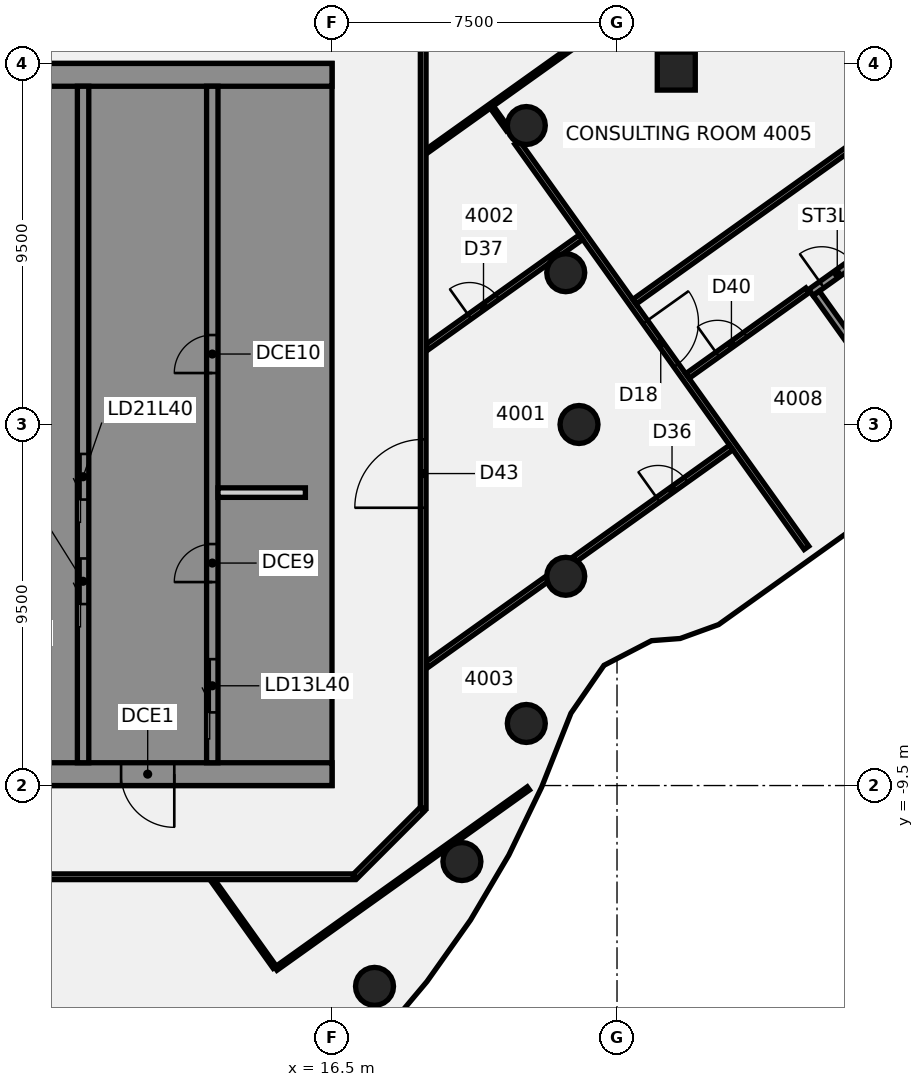
"""IFC4 building model, lengths in metres.
Left out: names, types, materials, properties, quantities, classifications, styles, units other than length and angle.
Written with IfcOpenShell. Run it as: python <this file> out.ifc"""

import sys

from ifc_helpers import new_model, si_unit, direction, frame, frame_2d, origin, origin_2d, place, context, subcontext, project, spatial, polyline, rectangle, circle, outline, extrude, element, fill, save


model = new_model("IFC4")
c1 = context("Model", 3, precision=1e-05, world=origin(), true_north=direction((0.0, 1.0)))
c2 = subcontext(c1, "Body", "Model", "MODEL_VIEW")
j1 = project(units=[si_unit("LENGTHUNIT", "METRE"), si_unit("PLANEANGLEUNIT", "RADIAN")], contexts=[c1])
p1 = place(None, origin())
s1 = spatial("IfcSite", under=j1, at=p1, CompositionType="ELEMENT")
p2 = place(p1, origin())
s2 = spatial("IfcBuilding", under=s1, at=p2, CompositionType="ELEMENT")
p3 = place(p2, frame((0.0, 0.0, 163.0)))
s3 = spatial("IfcBuildingStorey", under=s2, at=p3, CompositionType="ELEMENT", Elevation=163.0)
for number, where, z_axis, x_axis in (
    (1, (23.0, 0.0, -0.14), (0.0, 0.0, 1.0), (1.0, 0.0, 0.0)),
    (2, (22.651, 3.994, -0.14), (0.0, 0.0, 1.0), (1.0, 0.0, 0.0)),
    (3, (21.613, 7.866, -0.14), (0.0, 0.0, 1.0), (1.0, 0.0, 0.0)),
    (4, (17.619, -14.784, -0.14), (0.0, 0.0, 1.0), (1.0, 0.0, 0.0)),
    (5, (19.919, -11.5, -0.14), (0.0, 0.0, 1.0), (1.0, 0.0, 0.0)),
    (6, (21.613, -7.866, -0.14), (0.0, 0.0, 1.0), (1.0, 0.0, 0.0)),
    (7, (22.651, -3.994, -0.14), (0.0, 0.0, 1.0), (1.0, 0.0, 0.0)),
):
    element("IfcColumn", number, at=place(p3, frame(where, z_axis=z_axis, x_axis=x_axis)), inside=s3, PredefinedType="COLUMN", context=c2, shape_type="SweptSolid", body=[
        extrude(circle(Radius=0.5, at=origin_2d()), origin(), (0.0, 0.0, 1.0), 3.75),
    ])
p4 = place(p3, frame((25.56, 9.299, -0.139), z_axis=(-0.045356883654, 0.016919354017, 0.998827556971), x_axis=(0.579654184092, -0.813874885655, 0.040108569717)))
e8 = element("IfcColumn", 8, at=p4, inside=s3, PredefinedType="COLUMN", context=c2, shape_type="SweptSolid", body=[
    extrude(rectangle(XDim=1.0, YDim=1.0, at=origin_2d()), origin(), (0.0, 0.0, 1.0), 3.752),
])
p5 = place(p3, frame((2.201, -12.002, 0.0), z_axis=(0.0, 0.0, 1.0), x_axis=(0.580967898018, -0.813926471785, 0.0)))
e9 = element("IfcWall", 9, at=p5, inside=s3, PredefinedType="PARTITIONING", context=c2, shape_type="SweptSolid", body=[
    extrude(rectangle(XDim=13.672, YDim=0.15, at=frame_2d((6.836, 0.0))), origin(), (0.0, 0.0, 1.0), 3.01),
])
p6 = place(p3, frame((13.355, -11.986, 0.0), z_axis=(0.0, 0.0, 1.0), x_axis=(0.581139863007, -0.813803698458, 0.0)))
e10 = element("IfcWall", 10, at=p6, inside=s3, PredefinedType="PARTITIONING", context=c2, shape_type="SweptSolid", body=[
    extrude(rectangle(XDim=2.819, YDim=0.1, at=frame_2d((1.409, 0.0))), origin(), (0.0, 0.0, 1.0), 3.01),
])
p7 = place(p3, frame((20.706, 8.352, 0.0), z_axis=(0.0, 0.0, 1.0), x_axis=(0.58101820206, -0.813890563206, 0.0)))
e11 = element("IfcWall", 11, at=p7, inside=s3, PredefinedType="PARTITIONING", context=c2, shape_type="SweptSolid", body=[
    extrude(rectangle(XDim=0.735, YDim=0.1, at=frame_2d((0.367, 0.0))), origin(), (0.0, 0.0, 1.0), 3.01),
])
p8 = place(p3, frame((21.371, 7.421, 0.0), z_axis=(0.0, 0.0, 1.0), x_axis=(0.581007311964, -0.813898337291, 0.0)))
e12 = element("IfcWall", 12, at=p8, inside=s3, PredefinedType="PARTITIONING", context=c2, shape_type="SweptSolid", body=[
    extrude(rectangle(XDim=13.105, YDim=0.15, at=frame_2d((6.552, 0.0))), origin(), (0.0, 0.0, 1.0), 3.01),
])
p9 = place(p8, frame((5.806, 0.0, 0.0)))
e13 = element("IfcOpeningElement", 13, at=p9, cuts=e12, PredefinedType="OPENING", context=c2, shape_type="SweptSolid", body=[
    extrude(rectangle(XDim=1.4, YDim=2.1, at=frame_2d((0.7, 1.05))), frame((0.0, 0.085, 0.0), z_axis=(0.0, -1.0, 0.0), x_axis=(1.0, 0.0, 0.0)), (0.0, 0.0, 1.0), 0.17),
])
p10 = place(p3, frame((-17.1, -11.9, 0.0), z_axis=(0.0, 0.0, 1.0), x_axis=(1.0, 0.0, 0.0)))
e14 = element("IfcWall", 14, at=p10, inside=s3, PredefinedType="PARTITIONING", context=c2, shape_type="SweptSolid", body=[
    extrude(rectangle(XDim=34.165, YDim=0.15, at=frame_2d((17.083, 0.0))), origin(), (0.0, 0.0, 1.0), 3.01),
])
p11 = place(p10, frame((9.703, 0.0, 0.0)))
e15 = element("IfcOpeningElement", 15, at=p11, cuts=e14, PredefinedType="OPENING", context=c2, shape_type="SweptSolid", body=[
    extrude(rectangle(XDim=1.8, YDim=2.1, at=frame_2d((0.9, 1.05))), frame((0.0, 0.085, 0.0), z_axis=(0.0, -1.0, 0.0), x_axis=(1.0, 0.0, 0.0)), (0.0, 0.0, 1.0), 0.17),
])
p12 = place(p10, frame((1.95, 0.0, 0.0)))
e16 = element("IfcOpeningElement", 16, at=p12, cuts=e14, PredefinedType="OPENING", context=c2, shape_type="SweptSolid", body=[
    extrude(rectangle(XDim=1.8, YDim=2.1, at=frame_2d((0.9, 1.05))), frame((0.0, 0.085, 0.0), z_axis=(0.0, -1.0, 0.0), x_axis=(1.0, 0.0, 0.0)), (0.0, 0.0, 1.0), 0.17),
])
p13 = place(p10, frame((23.878, 0.0, 0.0)))
e17 = element("IfcOpeningElement", 17, at=p13, cuts=e14, PredefinedType="OPENING", context=c2, shape_type="SweptSolid", body=[
    extrude(rectangle(XDim=1.8, YDim=2.1, at=frame_2d((0.9, 1.05))), frame((0.0, 0.085, 0.0), z_axis=(0.0, -1.0, 0.0), x_axis=(1.0, 0.0, 0.0)), (0.0, 0.0, 1.0), 0.17),
])
p14 = place(p3, frame((15.022, -14.32, 0.0), z_axis=(0.0, 0.0, 1.0), x_axis=(0.813848610714, 0.581076964643, 0.0)))
e18 = element("IfcWall", 18, at=p14, inside=s3, PredefinedType="PARTITIONING", context=c2, shape_type="SweptSolid", body=[
    extrude(rectangle(XDim=8.165, YDim=0.1, at=frame_2d((4.083, 0.0))), origin(), (0.0, 0.0, 1.0), 3.01),
])
p15 = place(p3, frame((19.002, -6.318, 0.0), z_axis=(0.0, 0.0, 1.0), x_axis=(0.813818497272, 0.581119138816, 0.0)))
e19 = element("IfcWall", 19, at=p15, inside=s3, PredefinedType="PARTITIONING", context=c2, shape_type="SweptSolid", body=[
    extrude(rectangle(XDim=3.88, YDim=0.15, at=frame_2d((1.94, 0.0))), origin(), (0.0, 0.0, 1.0), 3.01),
])
p16 = place(p3, frame((22.884, -3.546, 0.0), z_axis=(0.0, 0.0, 1.0), x_axis=(0.813857304892, 0.581064787502, 0.0)))
e20 = element("IfcWall", 20, at=p16, inside=s3, PredefinedType="PARTITIONING", context=c2, shape_type="SweptSolid", body=[
    extrude(rectangle(XDim=5.061, YDim=0.15, at=frame_2d((2.531, 0.0))), origin(), (0.0, 0.0, 1.0), 3.01),
])
p17 = place(p16, frame((2.7, 0.0, 0.0)))
e21 = element("IfcOpeningElement", 21, at=p17, cuts=e20, PredefinedType="OPENING", context=c2, shape_type="SweptSolid", body=[
    extrude(rectangle(XDim=0.9, YDim=2.1, at=frame_2d((0.45, 1.05))), frame((0.0, 0.085, 0.0), z_axis=(0.0, -1.0, 0.0), x_axis=(1.0, 0.0, 0.0)), (0.0, 0.0, 1.0), 0.17),
])
p18 = place(p3, frame((19.002, 2.037, 0.0), z_axis=(0.0, 0.0, 1.0), x_axis=(0.813849467295, 0.581075764925, 0.0)))
e22 = element("IfcWall", 22, at=p18, inside=s3, PredefinedType="PARTITIONING", context=c2, shape_type="SweptSolid", body=[
    extrude(rectangle(XDim=4.977, YDim=0.15, at=frame_2d((2.488, 0.0))), origin(), (0.0, 0.0, 1.0), 3.01),
])
p19 = place(p18, frame((1.375, 0.0, 0.0)))
e23 = element("IfcOpeningElement", 23, at=p19, cuts=e22, PredefinedType="OPENING", context=c2, shape_type="SweptSolid", body=[
    extrude(rectangle(XDim=0.9, YDim=2.1, at=frame_2d((0.45, 1.05))), frame((0.0, 0.085, 0.0), z_axis=(0.0, -1.0, 0.0), x_axis=(1.0, 0.0, 0.0)), (0.0, 0.0, 1.0), 0.17),
])
p20 = place(p3, frame((18.986, 7.186, 0.0), z_axis=(0.0, 0.0, 1.0), x_axis=(0.814008739191, 0.580852625474, 0.0)))
e24 = element("IfcWall", 24, at=p20, inside=s3, PredefinedType="PARTITIONING", context=c2, shape_type="SweptSolid", body=[
    extrude(rectangle(XDim=5.092, YDim=0.1, at=frame_2d((2.546, 0.0))), origin(), (0.0, 0.0, 1.0), 3.01),
])
p21 = place(p3, frame((24.461, 3.231, 0.0), z_axis=(0.0, 0.0, 1.0), x_axis=(0.81388139954, 0.581031038313, 0.0)))
e25 = element("IfcWall", 25, at=p21, inside=s3, PredefinedType="PARTITIONING", context=c2, shape_type="SweptSolid", body=[
    extrude(rectangle(XDim=17.839, YDim=0.15, at=frame_2d((8.919, 0.0))), origin(), (0.0, 0.0, 1.0), 3.01),
])
p22 = place(p21, frame((8.17, 0.0, 0.0)))
e26 = element("IfcOpeningElement", 26, at=p22, cuts=e25, PredefinedType="OPENING", context=c2, shape_type="SweptSolid", body=[
    extrude(rectangle(XDim=0.9, YDim=2.1, at=frame_2d((0.45, 1.05))), frame((0.0, 0.085, 0.0), z_axis=(0.0, -1.0, 0.0), x_axis=(1.0, 0.0, 0.0)), (0.0, 0.0, 1.0), 0.17),
])
p23 = place(p21, frame((14.62, 0.0, 0.0)))
e27 = element("IfcOpeningElement", 27, at=p23, cuts=e25, PredefinedType="OPENING", context=c2, shape_type="SweptSolid", body=[
    extrude(rectangle(XDim=0.9, YDim=2.1, at=frame_2d((0.45, 1.05))), frame((0.0, 0.085, 0.0), z_axis=(0.0, -1.0, 0.0), x_axis=(1.0, 0.0, 0.0)), (0.0, 0.0, 1.0), 0.17),
])
p24 = place(p3, frame((25.855, 1.278, 0.0), z_axis=(0.0, 0.0, 1.0), x_axis=(0.813869502559, 0.581047702693, 0.0)))
e28 = element("IfcWall", 28, at=p24, inside=s3, PredefinedType="PARTITIONING", context=c2, shape_type="SweptSolid", body=[
    extrude(rectangle(XDim=3.88, YDim=0.15, at=frame_2d((1.94, 0.0))), origin(), (0.0, 0.0, 1.0), 3.01),
])
p25 = place(p24, frame((0.97, 0.0, 0.0)))
e29 = element("IfcOpeningElement", 29, at=p25, cuts=e28, PredefinedType="OPENING", context=c2, shape_type="SweptSolid", body=[
    extrude(rectangle(XDim=0.9, YDim=2.1, at=frame_2d((0.45, 1.05))), frame((0.0, 0.085, 0.0), z_axis=(0.0, -1.0, 0.0), x_axis=(1.0, 0.0, 0.0)), (0.0, 0.0, 1.0), 0.17),
])
p26 = place(p3, frame((17.1, -11.9, 0.0), z_axis=(0.0, 0.0, 1.0), x_axis=(0.707106781187, 0.707106781187, 0.0)))
e30 = element("IfcWall", 30, at=p26, inside=s3, PredefinedType="PARTITIONING", context=c2, shape_type="SweptSolid", body=[
    extrude(rectangle(XDim=2.505, YDim=0.15, at=frame_2d((1.253, 0.0))), origin(), (0.0, 0.0, 1.0), 3.01),
])
p27 = place(p3, frame((18.9, -10.1, 0.0), z_axis=(0.0, 0.0, 1.0), x_axis=(0.0, 1.0, 0.0)))
e31 = element("IfcWall", 31, at=p27, inside=s3, PredefinedType="PARTITIONING", context=c2, shape_type="SweptSolid", body=[
    extrude(rectangle(XDim=20.2, YDim=0.15, at=frame_2d((10.1, 0.0))), origin(), (0.0, 0.0, 1.0), 3.01),
])
p28 = place(p27, frame((7.909, 0.0, 0.0)))
e32 = element("IfcOpeningElement", 32, at=p28, cuts=e31, PredefinedType="OPENING", context=c2, shape_type="SweptSolid", body=[
    extrude(rectangle(XDim=1.8, YDim=2.1, at=frame_2d((0.9, 1.05))), frame((0.0, 0.085, 0.0), z_axis=(0.0, -1.0, 0.0), x_axis=(1.0, 0.0, 0.0)), (0.0, 0.0, 1.0), 0.17),
])
p29 = place(p3, frame((16.5, -9.2, 0.0), z_axis=(0.0, 0.0, 1.0), x_axis=(-1.0, 0.0, 0.0)))
e33 = element("IfcWall", 33, at=p29, inside=s3, PredefinedType="SHEAR", context=c2, shape_type="SweptSolid", body=[
    extrude(rectangle(XDim=13.0, YDim=0.6, at=frame_2d((6.5, 0.0))), origin(), (0.0, 0.0, 1.0), 3.61),
])
p30 = place(p29, frame((4.15, 0.0, 0.0)))
e34 = element("IfcOpeningElement", 34, at=p30, cuts=e33, PredefinedType="OPENING", context=c2, shape_type="SweptSolid", body=[
    extrude(rectangle(XDim=1.4, YDim=2.1, at=frame_2d((0.7, 1.05))), frame((0.0, 0.31, 0.0), z_axis=(0.0, -1.0, 0.0), x_axis=(1.0, 0.0, 0.0)), (0.0, 0.0, 1.0), 0.62),
])
p31 = place(p29, frame((10.125, 0.0, 0.0)))
e35 = element("IfcOpeningElement", 35, at=p31, cuts=e33, PredefinedType="OPENING", context=c2, shape_type="SweptSolid", body=[
    extrude(rectangle(XDim=1.4, YDim=2.1, at=frame_2d((0.7, 1.05))), frame((0.0, 0.31, 0.0), z_axis=(0.0, -1.0, 0.0), x_axis=(1.0, 0.0, 0.0)), (0.0, 0.0, 1.0), 0.62),
])
p32 = place(p3, origin())
e36 = element("IfcWall", 36, at=p32, inside=s3, PredefinedType="SHEAR", context=c2, shape_type="SweptSolid", body=[
    extrude(outline(polyline([(13.5, -8.125), (13.5, -8.9), (15.9, -8.9), (16.5, -8.9), (16.5, 8.9), (15.9, 8.9), (13.5, 8.9), (13.5, 8.125), (15.9, 8.125), (15.9, 5.625), (13.5, 5.625), (13.5, 5.375), (15.9, 5.375), (15.9, -5.375), (13.5, -5.375), (13.5, -5.625), (15.9, -5.625), (15.9, -8.125), (13.5, -8.125)])), origin(), (0.0, 0.0, 1.0), 3.61),
])
p33 = place(p3, frame((16.5, 9.2, 0.0), z_axis=(0.0, 0.0, 1.0), x_axis=(-1.0, 0.0, 0.0)))
e37 = element("IfcWall", 37, at=p33, inside=s3, PredefinedType="SHEAR", context=c2, shape_type="SweptSolid", body=[
    extrude(rectangle(XDim=13.0, YDim=0.6, at=frame_2d((6.5, 0.0))), origin(), (0.0, 0.0, 1.0), 3.61),
])
p34 = place(p3, origin())
e38 = element("IfcWall", 38, at=p34, inside=s3, PredefinedType="SHEAR", context=c2, shape_type="SweptSolid", body=[
    extrude(outline(polyline([(9.8, -5.375), (7.5, -5.375), (7.5, -2.875), (9.8, -2.875), (9.8, -2.625), (7.5, -2.625), (7.5, -0.125), (9.8, -0.125), (9.8, 0.125), (7.5, 0.125), (7.5, 2.625), (9.8, 2.625), (9.8, 2.875), (7.5, 2.875), (7.5, 5.375), (9.8, 5.375), (9.8, 5.625), (7.5, 5.625), (7.5, 8.125), (9.8, 8.125), (9.8, 8.9), (7.5, 8.9), (7.2, 8.9), (7.2, -5.625), (7.5, -5.625), (9.8, -5.625), (9.8, -5.375)])), origin(), (0.0, 0.0, 1.0), 3.61),
])
p35 = place(p3, origin())
e39 = element("IfcWall", 39, at=p35, inside=s3, PredefinedType="SHEAR", context=c2, shape_type="SweptSolid", body=[
    extrude(outline(polyline([(7.5, -8.125), (7.5, -8.9), (9.8, -8.9), (9.8, -8.125), (9.8, -5.625), (9.55, -5.625), (9.55, -8.125), (7.5, -8.125)])), origin(), (0.0, 0.0, 1.0), 3.61),
])
p36 = place(p3, frame((13.35, -8.9, 0.0), z_axis=(0.0, 0.0, 1.0), x_axis=(0.0, 1.0, 0.0)))
e40 = element("IfcWall", 40, at=p36, inside=s3, PredefinedType="SHEAR", context=c2, shape_type="SweptSolid", body=[
    extrude(rectangle(XDim=17.8, YDim=0.3, at=frame_2d((8.9, 0.0))), origin(), (0.0, 0.0, 1.0), 3.61),
])
p37 = place(p36, frame((1.325, 0.0, 0.0)))
e41 = element("IfcOpeningElement", 41, at=p37, cuts=e40, PredefinedType="OPENING", context=c2, shape_type="SweptSolid", body=[
    extrude(rectangle(XDim=1.4, YDim=2.1, at=frame_2d((0.7, 1.05))), frame((0.0, 0.16, 0.0), z_axis=(0.0, -1.0, 0.0), x_axis=(1.0, 0.0, 0.0)), (0.0, 0.0, 1.0), 0.32),
])
p38 = place(p36, frame((4.754, 0.0, 0.0)))
e42 = element("IfcOpeningElement", 42, at=p38, cuts=e40, PredefinedType="OPENING", context=c2, shape_type="SweptSolid", body=[
    extrude(rectangle(XDim=1.0, YDim=2.1, at=frame_2d((0.5, 1.05))), frame((0.0, 0.16, 0.0), z_axis=(0.0, -1.0, 0.0), x_axis=(1.0, 0.0, 0.0)), (0.0, 0.0, 1.0), 0.32),
])
p39 = place(p36, frame((10.254, 0.0, 0.0)))
e43 = element("IfcOpeningElement", 43, at=p39, cuts=e40, PredefinedType="OPENING", context=c2, shape_type="SweptSolid", body=[
    extrude(rectangle(XDim=1.0, YDim=2.1, at=frame_2d((0.5, 1.05))), frame((0.0, 0.16, 0.0), z_axis=(0.0, -1.0, 0.0), x_axis=(1.0, 0.0, 0.0)), (0.0, 0.0, 1.0), 0.32),
])
p40 = place(p3, frame((9.95, -8.9, 0.0), z_axis=(0.0, 0.0, 1.0), x_axis=(0.0, 1.0, 0.0)))
e44 = element("IfcWall", 44, at=p40, inside=s3, PredefinedType="SHEAR", context=c2, shape_type="SweptSolid", body=[
    extrude(rectangle(XDim=17.8, YDim=0.3, at=frame_2d((8.9, 0.0))), origin(), (0.0, 0.0, 1.0), 3.61),
])
p41 = place(p40, frame((4.175, 0.0, 0.0)))
e45 = element("IfcOpeningElement", 45, at=p41, cuts=e44, PredefinedType="OPENING", context=c2, shape_type="SweptSolid", body=[
    extrude(rectangle(XDim=1.2, YDim=2.1, at=frame_2d((0.6, 1.05))), frame((0.0, 0.16, 0.0), z_axis=(0.0, -1.0, 0.0), x_axis=(1.0, 0.0, 0.0)), (0.0, 0.0, 1.0), 0.32),
])
p42 = place(p40, frame((6.925, 0.0, 0.0)))
e46 = element("IfcOpeningElement", 46, at=p42, cuts=e44, PredefinedType="OPENING", context=c2, shape_type="SweptSolid", body=[
    extrude(rectangle(XDim=1.2, YDim=2.1, at=frame_2d((0.6, 1.05))), frame((0.0, 0.16, 0.0), z_axis=(0.0, -1.0, 0.0), x_axis=(1.0, 0.0, 0.0)), (0.0, 0.0, 1.0), 0.32),
])
p43 = place(p3, frame((15.8, -1.792, 0.0), z_axis=(0.0, 0.0, 1.0), x_axis=(-1.0, 0.0, 0.0)))
e47 = element("IfcWall", 47, at=p43, inside=s3, PredefinedType="PARTITIONING", context=c2, shape_type="SweptSolid", body=[
    extrude(rectangle(XDim=2.3, YDim=0.25, at=frame_2d((1.15, 0.0))), origin(), (0.0, 0.0, 1.0), 3.61),
])
p44 = place(p3, frame((29.104, 3.474, -0.14), z_axis=(0.0, 0.0, 1.0), x_axis=(0.813893474933, 0.58101412329, 0.0)))
e48 = element("IfcWall", 48, at=p44, inside=s3, PredefinedType="SHEAR", context=c2, shape_type="SweptSolid", body=[
    extrude(rectangle(XDim=6.7, YDim=0.2, at=frame_2d((3.35, 0.0))), origin(), (0.0, 0.0, 1.0), 3.15),
])
p45 = place(p44, frame((0.35, 0.0, 0.0)))
e49 = element("IfcOpeningElement", 49, at=p45, cuts=e48, PredefinedType="OPENING", context=c2, shape_type="SweptSolid", body=[
    extrude(rectangle(XDim=1.0, YDim=2.1, at=frame_2d((0.5, 1.05))), frame((0.0, 0.11, 0.0), z_axis=(0.0, -1.0, 0.0), x_axis=(1.0, 0.0, 0.0)), (0.0, 0.0, 1.0), 0.22),
])
p46 = place(p3, frame((31.102, 0.846, -0.14), z_axis=(0.0, 0.0, 1.0), x_axis=(-0.580985567777, 0.8139138591, 0.0)))
e50 = element("IfcWall", 50, at=p46, inside=s3, PredefinedType="SHEAR", context=c2, shape_type="SweptSolid", body=[
    extrude(rectangle(XDim=3.2, YDim=0.2, at=frame_2d((1.6, 0.0))), origin(), (0.0, 0.0, 1.0), 3.15),
])
p47 = place(p9, frame((1.4, 0.0, 0.0), z_axis=(0.0, 0.0, 1.0), x_axis=(-1.0, 0.0, 0.0)))
e51 = element("IfcDoor", 51, at=p47, inside=s3, OperationType="DOUBLE_DOOR_SINGLE_SWING", PredefinedType="DOOR", context=c2, shape_type="SweptSolid", body=[
    extrude(rectangle(XDim=1.4, YDim=2.1, at=frame_2d((0.7, 1.05))), frame((0.0, 0.025, 0.0), z_axis=(0.0, -1.0, 0.0), x_axis=(1.0, 0.0, 0.0)), (0.0, 0.0, 1.0), 0.05),
])
fill(e13, e51)
p48 = place(p17, frame((0.9, 0.0, 0.0), z_axis=(0.0, 0.0, 1.0), x_axis=(-1.0, 0.0, 0.0)))
e52 = element("IfcDoor", 52, at=p48, inside=s3, OperationType="SINGLE_SWING_RIGHT", PredefinedType="DOOR", context=c2, shape_type="SweptSolid", body=[
    extrude(rectangle(XDim=0.9, YDim=2.1, at=frame_2d((0.45, 1.05))), frame((0.0, 0.025, 0.0), z_axis=(0.0, -1.0, 0.0), x_axis=(1.0, 0.0, 0.0)), (0.0, 0.0, 1.0), 0.05),
])
fill(e21, e52)
p49 = place(p19, origin())
e53 = element("IfcDoor", 53, at=p49, inside=s3, OperationType="SINGLE_SWING_RIGHT", PredefinedType="DOOR", context=c2, shape_type="SweptSolid", body=[
    extrude(rectangle(XDim=0.9, YDim=2.1, at=frame_2d((0.45, 1.05))), frame((0.0, 0.025, 0.0), z_axis=(0.0, -1.0, 0.0), x_axis=(1.0, 0.0, 0.0)), (0.0, 0.0, 1.0), 0.05),
])
fill(e23, e53)
p50 = place(p25, frame((0.9, 0.0, 0.0), z_axis=(0.0, 0.0, 1.0), x_axis=(-1.0, 0.0, 0.0)))
e54 = element("IfcDoor", 54, at=p50, inside=s3, OperationType="SINGLE_SWING_LEFT", PredefinedType="DOOR", context=c2, shape_type="SweptSolid", body=[
    extrude(rectangle(XDim=0.9, YDim=2.1, at=frame_2d((0.45, 1.05))), frame((0.0, 0.025, 0.0), z_axis=(0.0, -1.0, 0.0), x_axis=(1.0, 0.0, 0.0)), (0.0, 0.0, 1.0), 0.05),
])
fill(e29, e54)
p51 = place(p28, origin())
e55 = element("IfcDoor", 55, at=p51, inside=s3, OperationType="DOUBLE_DOOR_SINGLE_SWING", PredefinedType="DOOR", context=c2, shape_type="SweptSolid", body=[
    extrude(rectangle(XDim=1.8, YDim=2.1, at=frame_2d((0.9, 1.05))), frame((0.0, 0.025, 0.0), z_axis=(0.0, -1.0, 0.0), x_axis=(1.0, 0.0, 0.0)), (0.0, 0.0, 1.0), 0.05),
])
fill(e32, e55)
p52 = place(p30, origin())
e56 = element("IfcDoor", 56, at=p52, inside=s3, OperationType="SINGLE_SWING_LEFT", PredefinedType="DOOR", context=c2, shape_type="SweptSolid", body=[
    extrude(rectangle(XDim=1.4, YDim=2.1, at=frame_2d((0.7, 1.05))), frame((0.0, 0.025, 0.0), z_axis=(0.0, -1.0, 0.0), x_axis=(1.0, 0.0, 0.0)), (0.0, 0.0, 1.0), 0.05),
])
fill(e34, e56)
p53 = place(p37, origin())
e57 = element("IfcDoor", 57, at=p53, inside=s3, OperationType="SLIDING_TO_LEFT", PredefinedType="DOOR", context=c2, shape_type="SweptSolid", body=[
    extrude(rectangle(XDim=1.4, YDim=2.1, at=frame_2d((0.7, 1.05))), frame((0.0, 0.025, 0.0), z_axis=(0.0, -1.0, 0.0), x_axis=(1.0, 0.0, 0.0)), (0.0, 0.0, 1.0), 0.05),
])
fill(e41, e57)
p54 = place(p41, origin())
e58 = element("IfcDoor", 58, at=p54, inside=s3, OperationType="SLIDING_TO_LEFT", PredefinedType="DOOR", context=c2, shape_type="SweptSolid", body=[
    extrude(rectangle(XDim=1.2, YDim=2.1, at=frame_2d((0.6, 1.05))), frame((0.0, 0.025, 0.0), z_axis=(0.0, -1.0, 0.0), x_axis=(1.0, 0.0, 0.0)), (0.0, 0.0, 1.0), 0.05),
])
fill(e45, e58)
p55 = place(p42, origin())
e59 = element("IfcDoor", 59, at=p55, inside=s3, OperationType="SLIDING_TO_LEFT", PredefinedType="DOOR", context=c2, shape_type="SweptSolid", body=[
    extrude(rectangle(XDim=1.2, YDim=2.1, at=frame_2d((0.6, 1.05))), frame((0.0, 0.025, 0.0), z_axis=(0.0, -1.0, 0.0), x_axis=(1.0, 0.0, 0.0)), (0.0, 0.0, 1.0), 0.05),
])
fill(e46, e59)
p56 = place(p38, origin())
e60 = element("IfcDoor", 60, at=p56, inside=s3, OperationType="SINGLE_SWING_LEFT", PredefinedType="DOOR", context=c2, shape_type="SweptSolid", body=[
    extrude(rectangle(XDim=1.0, YDim=2.1, at=frame_2d((0.5, 1.05))), frame((0.0, 0.025, 0.0), z_axis=(0.0, -1.0, 0.0), x_axis=(1.0, 0.0, 0.0)), (0.0, 0.0, 1.0), 0.05),
])
fill(e42, e60)
p57 = place(p39, origin())
e61 = element("IfcDoor", 61, at=p57, inside=s3, OperationType="SINGLE_SWING_LEFT", PredefinedType="DOOR", context=c2, shape_type="SweptSolid", body=[
    extrude(rectangle(XDim=1.0, YDim=2.1, at=frame_2d((0.5, 1.05))), frame((0.0, 0.025, 0.0), z_axis=(0.0, -1.0, 0.0), x_axis=(1.0, 0.0, 0.0)), (0.0, 0.0, 1.0), 0.05),
])
fill(e43, e61)
p58 = place(p45, origin())
e62 = element("IfcDoor", 62, at=p58, inside=s3, OperationType="SINGLE_SWING_LEFT", PredefinedType="DOOR", context=c2, shape_type="SweptSolid", body=[
    extrude(rectangle(XDim=1.0, YDim=2.1, at=frame_2d((0.5, 1.05))), frame((0.0, 0.025, 0.0), z_axis=(0.0, -1.0, 0.0), x_axis=(1.0, 0.0, 0.0)), (0.0, 0.0, 1.0), 0.05),
])
fill(e49, e62)
save(model, sys.argv[1])
